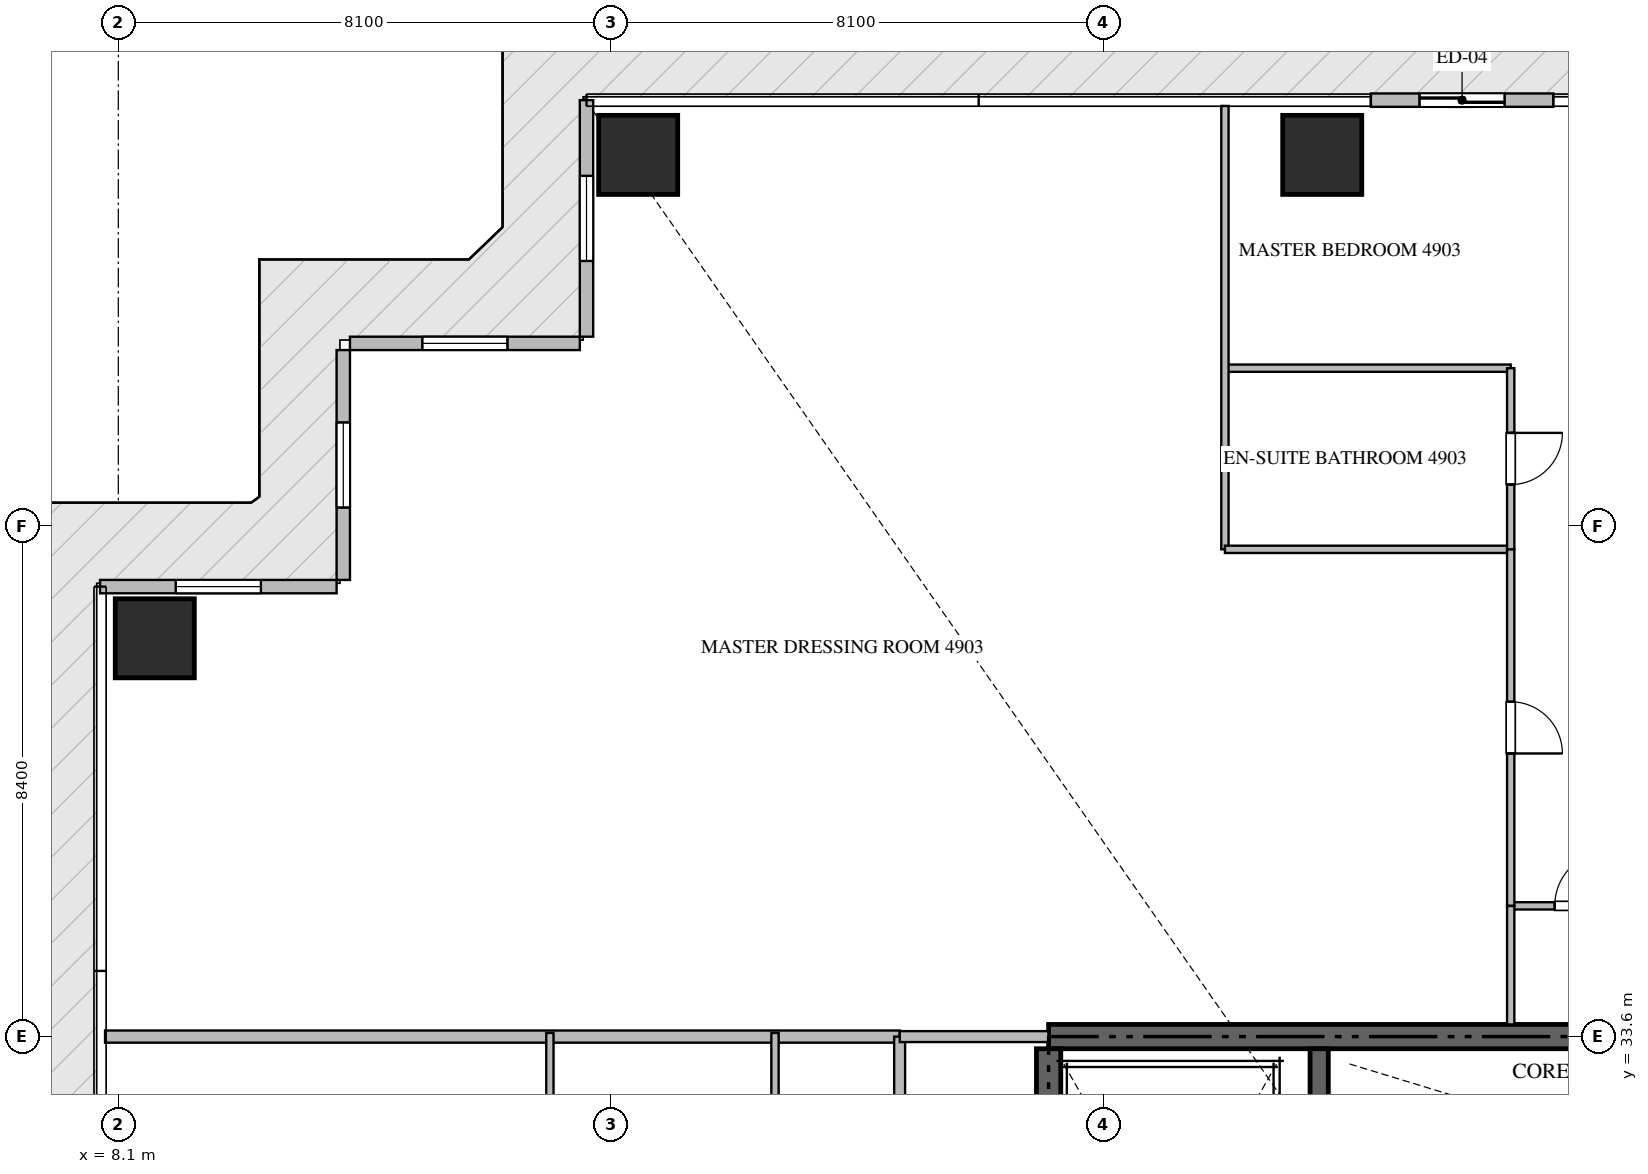
"""IFC4 building model, lengths in metres.
Left out: names, types, materials, properties, quantities, classifications, styles, units other than length and angle.
Written with IfcOpenShell. Run it as: python <this file> out.ifc"""

import sys

from ifc_helpers import new_model, si_unit, direction, frame, frame_2d, origin, origin_2d, place, context, subcontext, project, spatial, rectangle, extrude, source, transform, mapped, element, fill, save


model = new_model("IFC4")
c1 = context("Model", 3, precision=1e-05, world=origin(), true_north=direction((0.0, 1.0)))
c2 = subcontext(c1, "Body", "Model", "MODEL_VIEW")
j1 = project(units=[si_unit("LENGTHUNIT", "METRE"), si_unit("PLANEANGLEUNIT", "RADIAN")], contexts=[c1])
p1 = place(None, origin())
s1 = spatial("IfcSite", under=j1, at=p1, CompositionType="ELEMENT")
p2 = place(p1, origin())
s2 = spatial("IfcBuilding", under=s1, at=p2, CompositionType="ELEMENT")
p3 = place(p2, frame((0.0, 0.0, 195.15)))
s3 = spatial("IfcBuildingStorey", under=s2, at=p3, CompositionType="ELEMENT", Elevation=195.15)
p4 = place(p3, frame((41.4, 33.6, -0.26), z_axis=(0.0, 0.0, 1.0), x_axis=(-1.0, 0.0, 0.0)))
e1 = element("IfcWall", 1, at=p4, inside=s3, PredefinedType="SHEAR", context=c2, shape_type="SweptSolid", body=[
    extrude(rectangle(XDim=18.0, YDim=0.4, at=frame_2d((9.0, 0.0))), origin(), (0.0, 0.0, 1.0), 3.568),
])
p5 = place(p3, frame((23.4, 24.25, -0.26), z_axis=(0.0, 0.0, 1.0), x_axis=(0.0, 1.0, 0.0)))
e2 = element("IfcWall", 2, at=p5, inside=s3, PredefinedType="SHEAR", context=c2, shape_type="SweptSolid", body=[
    extrude(rectangle(XDim=9.15, YDim=0.4, at=frame_2d((4.575, 0.0))), origin(), (0.0, 0.0, 1.0), 3.568),
])
p6 = place(p3, frame((27.85, 23.55, -0.26), z_axis=(0.0, 0.0, 1.0), x_axis=(0.0, 1.0, 0.0)))
e3 = element("IfcWall", 3, at=p6, inside=s3, PredefinedType="SHEAR", context=c2, shape_type="SweptSolid", body=[
    extrude(rectangle(XDim=9.85, YDim=0.3, at=frame_2d((4.925, 0.0))), origin(), (0.0, 0.0, 1.0), 3.568),
])
m1 = source(origin(), c2, "Body", "SweptSolid", [
    extrude(rectangle(XDim=1.3, YDim=1.3, at=origin_2d()), origin(), (0.0, 0.0, 1.0), 3.57),
])
for number, where, z_axis, x_axis in (
    (4, (16.65, 48.1, -0.26), (0.0, 0.0, 1.0), (1.0, 0.0, 0.0)),
    (5, (27.9, 48.1, -0.26), (0.0, 0.0, 1.0), (1.0, 0.0, 0.0)),
    (6, (8.7, 40.15, -0.26), (0.0, 0.0, 1.0), (1.0, 0.0, 0.0)),
):
    element("IfcColumn", number, at=place(p3, frame(where, z_axis=z_axis, x_axis=x_axis)), inside=s3, PredefinedType="COLUMN", context=c2, shape_type="MappedRepresentation", body=[
        mapped(m1, transform((0.0, 0.0, 0.0), scale=1.0)),
    ])
p7 = place(p3, frame((31.7, 49.0, 0.0), z_axis=(0.0, 0.0, 1.0), x_axis=(-1.0, 0.0, 0.0)))
e7 = element("IfcWall", 7, at=p7, inside=s3, PredefinedType="ELEMENTEDWALL", context=c2, shape_type="SweptSolid", body=[
    extrude(rectangle(XDim=3.0, YDim=0.22, at=frame_2d((1.5, 0.0))), origin(), (0.0, 0.0, 1.0), 3.295),
])
p8 = place(p7, frame((0.8, 0.0, 0.0)))
e8 = element("IfcOpeningElement", 8, at=p8, cuts=e7, PredefinedType="OPENING", context=c2, shape_type="SweptSolid", body=[
    extrude(rectangle(XDim=1.4, YDim=2.25, at=frame_2d((0.7, 1.125))), frame((0.0, 0.12, 0.0), z_axis=(0.0, -1.0, 0.0), x_axis=(1.0, 0.0, 0.0)), (0.0, 0.0, 1.0), 0.24),
])
p9 = place(p3, frame((15.8, 49.0, 0.0), z_axis=(0.0, 0.0, 1.0), x_axis=(0.0, -1.0, 0.0)))
e9 = element("IfcWall", 9, at=p9, inside=s3, PredefinedType="ELEMENTEDWALL", context=c2, shape_type="SweptSolid", body=[
    extrude(rectangle(XDim=3.89, YDim=0.22, at=frame_2d((1.945, 0.0))), origin(), (0.0, 0.0, 1.0), 3.295),
])
p10 = place(p9, frame((1.245, 0.0, 0.65)))
e10 = element("IfcOpeningElement", 10, at=p10, cuts=e9, PredefinedType="OPENING", context=c2, shape_type="SweptSolid", body=[
    extrude(rectangle(XDim=1.4, YDim=1.35, at=frame_2d((0.7, 0.675))), frame((0.0, 0.12, 0.0), z_axis=(0.0, -1.0, 0.0), x_axis=(1.0, 0.0, 0.0)), (0.0, 0.0, 1.0), 0.24),
])
p11 = place(p3, frame((15.69, 45.0, 0.0), z_axis=(0.0, 0.0, 1.0), x_axis=(-1.0, 0.0, 0.0)))
e11 = element("IfcWall", 11, at=p11, inside=s3, PredefinedType="ELEMENTEDWALL", context=c2, shape_type="SweptSolid", body=[
    extrude(rectangle(XDim=3.78, YDim=0.22, at=frame_2d((1.89, 0.0))), origin(), (0.0, 0.0, 1.0), 3.295),
])
p12 = place(p11, frame((1.19, 0.0, 0.65)))
e12 = element("IfcOpeningElement", 12, at=p12, cuts=e11, PredefinedType="OPENING", context=c2, shape_type="SweptSolid", body=[
    extrude(rectangle(XDim=1.4, YDim=1.35, at=frame_2d((0.7, 0.675))), frame((0.0, 0.12, 0.0), z_axis=(0.0, -1.0, 0.0), x_axis=(1.0, 0.0, 0.0)), (0.0, 0.0, 1.0), 0.24),
])
p13 = place(p3, frame((11.8, 44.89, 0.0), z_axis=(0.0, 0.0, 1.0), x_axis=(0.0, -1.0, 0.0)))
e13 = element("IfcWall", 13, at=p13, inside=s3, PredefinedType="ELEMENTEDWALL", context=c2, shape_type="SweptSolid", body=[
    extrude(rectangle(XDim=3.78, YDim=0.22, at=frame_2d((1.89, 0.0))), origin(), (0.0, 0.0, 1.0), 3.295),
])
p14 = place(p13, frame((1.19, 0.0, 0.65)))
e14 = element("IfcOpeningElement", 14, at=p14, cuts=e13, PredefinedType="OPENING", context=c2, shape_type="SweptSolid", body=[
    extrude(rectangle(XDim=1.4, YDim=1.35, at=frame_2d((0.7, 0.675))), frame((0.0, 0.12, 0.0), z_axis=(0.0, -1.0, 0.0), x_axis=(1.0, 0.0, 0.0)), (0.0, 0.0, 1.0), 0.24),
])
p15 = place(p3, frame((11.69, 41.0, 0.0), z_axis=(0.0, 0.0, 1.0), x_axis=(-1.0, 0.0, 0.0)))
e15 = element("IfcWall", 15, at=p15, inside=s3, PredefinedType="ELEMENTEDWALL", context=c2, shape_type="SweptSolid", body=[
    extrude(rectangle(XDim=3.89, YDim=0.22, at=frame_2d((1.945, 0.0))), origin(), (0.0, 0.0, 1.0), 3.295),
])
p16 = place(p15, frame((1.245, 0.0, 0.65)))
e16 = element("IfcOpeningElement", 16, at=p16, cuts=e15, PredefinedType="OPENING", context=c2, shape_type="SweptSolid", body=[
    extrude(rectangle(XDim=1.4, YDim=1.35, at=frame_2d((0.7, 0.675))), frame((0.0, 0.12, 0.0), z_axis=(0.0, -1.0, 0.0), x_axis=(1.0, 0.0, 0.0)), (0.0, 0.0, 1.0), 0.24),
])
p17 = place(p3, frame((7.882, 33.6, 0.0), z_axis=(0.0, 0.0, 1.0), x_axis=(1.0, 0.0, 0.0)))
e17 = element("IfcWall", 17, at=p17, inside=s3, PredefinedType="PARTITIONING", context=c2, shape_type="SweptSolid", body=[
    extrude(rectangle(XDim=13.068, YDim=0.2, at=frame_2d((6.534, 0.0))), origin(), (0.0, 0.0, 1.0), 3.31),
])
p18 = place(p3, frame((20.95, 14.9, 0.0), z_axis=(0.0, 0.0, 1.0), x_axis=(0.0, 1.0, 0.0)))
e18 = element("IfcWall", 18, at=p18, inside=s3, PredefinedType="PARTITIONING", context=c2, shape_type="SweptSolid", body=[
    extrude(rectangle(XDim=18.7, YDim=0.18, at=frame_2d((9.35, 0.0))), origin(), (0.0, 0.0, 1.0), 3.31),
])
p19 = place(p18, frame((1.805, 0.0, 0.0)))
e19 = element("IfcOpeningElement", 19, at=p19, cuts=e18, PredefinedType="OPENING", context=c2, shape_type="SweptSolid", body=[
    extrude(rectangle(XDim=1.0, YDim=2.15, at=frame_2d((0.5, 1.075))), frame((0.0, 0.1, 0.0), z_axis=(0.0, -1.0, 0.0), x_axis=(1.0, 0.0, 0.0)), (0.0, 0.0, 1.0), 0.2),
])
p20 = place(p18, frame((10.602, 0.0, 0.0)))
e20 = element("IfcOpeningElement", 20, at=p20, cuts=e18, PredefinedType="OPENING", context=c2, shape_type="SweptSolid", body=[
    extrude(rectangle(XDim=1.0, YDim=2.15, at=frame_2d((0.5, 1.075))), frame((0.0, 0.1, 0.0), z_axis=(0.0, -1.0, 0.0), x_axis=(1.0, 0.0, 0.0)), (0.0, 0.0, 1.0), 0.2),
])
p21 = place(p3, frame((20.952, 33.6, 0.0), z_axis=(0.0, 0.0, 1.0), x_axis=(1.0, 0.0, 0.0)))
e21 = element("IfcWall", 21, at=p21, inside=s3, PredefinedType="PARTITIONING", context=c2, shape_type="SweptSolid", body=[
    extrude(rectangle(XDim=2.446, YDim=0.18, at=frame_2d((1.223, 0.0))), origin(), (0.0, 0.0, 1.0), 3.31),
])
p22 = place(p3, frame((31.0, 35.75, 0.0), z_axis=(0.0, 0.0, 1.0), x_axis=(1.0, 0.0, 0.0)))
e22 = element("IfcWall", 22, at=p22, inside=s3, PredefinedType="PARTITIONING", context=c2, shape_type="SweptSolid", body=[
    extrude(rectangle(XDim=2.348, YDim=0.12, at=frame_2d((1.174, 0.0))), origin(), (0.0, 0.0, 1.0), 3.31),
])
p23 = place(p22, frame((0.724, 0.0, 0.0)))
e23 = element("IfcOpeningElement", 23, at=p23, cuts=e22, PredefinedType="OPENING", context=c2, shape_type="SweptSolid", body=[
    extrude(rectangle(XDim=0.9, YDim=2.1, at=frame_2d((0.45, 1.05))), frame((0.0, 0.07, 0.0), z_axis=(0.0, -1.0, 0.0), x_axis=(1.0, 0.0, 0.0)), (0.0, 0.0, 1.0), 0.14),
])
p24 = place(p3, frame((26.3, 44.592, 0.0), z_axis=(0.0, 0.0, 1.0), x_axis=(1.0, 0.0, 0.0)))
e24 = element("IfcWall", 24, at=p24, inside=s3, PredefinedType="PARTITIONING", context=c2, shape_type="SweptSolid", body=[
    extrude(rectangle(XDim=4.7, YDim=0.12, at=frame_2d((2.35, 0.0))), origin(), (0.0, 0.0, 1.0), 3.31),
])
p25 = place(p3, frame((26.3, 48.905, 0.0), z_axis=(0.0, 0.0, 1.0), x_axis=(0.0, -1.0, 0.0)))
e25 = element("IfcWall", 25, at=p25, inside=s3, PredefinedType="PARTITIONING", context=c2, shape_type="SweptSolid", body=[
    extrude(rectangle(XDim=7.292, YDim=0.12, at=frame_2d((3.646, 0.0))), origin(), (0.0, 0.0, 1.0), 3.31),
])
p26 = place(p3, frame((26.3, 41.613, 0.0), z_axis=(0.0, 0.0, 1.0), x_axis=(1.0, 0.0, 0.0)))
e26 = element("IfcWall", 26, at=p26, inside=s3, PredefinedType="PARTITIONING", context=c2, shape_type="SweptSolid", body=[
    extrude(rectangle(XDim=4.7, YDim=0.12, at=frame_2d((2.35, 0.0))), origin(), (0.0, 0.0, 1.0), 3.31),
])
p27 = place(p3, frame((31.0, 44.592, 0.0), z_axis=(0.0, 0.0, 1.0), x_axis=(0.0, -1.0, 0.0)))
e27 = element("IfcWall", 27, at=p27, inside=s3, PredefinedType="PARTITIONING", context=c2, shape_type="SweptSolid", body=[
    extrude(rectangle(XDim=2.979, YDim=0.12, at=frame_2d((1.49, 0.0))), origin(), (0.0, 0.0, 1.0), 3.31),
])
p28 = place(p27, frame((1.064, 0.0, 0.0)))
e28 = element("IfcOpeningElement", 28, at=p28, cuts=e27, PredefinedType="OPENING", context=c2, shape_type="SweptSolid", body=[
    extrude(rectangle(XDim=0.85, YDim=2.1, at=frame_2d((0.425, 1.05))), frame((0.0, 0.07, 0.0), z_axis=(0.0, -1.0, 0.0), x_axis=(1.0, 0.0, 0.0)), (0.0, 0.0, 1.0), 0.14),
])
p29 = place(p3, frame((31.0, 41.611, 0.0), z_axis=(0.0, 0.0, 1.0), x_axis=(0.0, -1.0, 0.0)))
e29 = element("IfcWall", 29, at=p29, inside=s3, PredefinedType="PARTITIONING", context=c2, shape_type="SweptSolid", body=[
    extrude(rectangle(XDim=5.861, YDim=0.12, at=frame_2d((2.931, 0.0))), origin(), (0.0, 0.0, 1.0), 3.31),
])
p30 = place(p29, frame((2.505, 0.0, 0.0)))
e30 = element("IfcOpeningElement", 30, at=p30, cuts=e29, PredefinedType="OPENING", context=c2, shape_type="SweptSolid", body=[
    extrude(rectangle(XDim=0.85, YDim=2.1, at=frame_2d((0.425, 1.05))), frame((0.0, 0.07, 0.0), z_axis=(0.0, -1.0, 0.0), x_axis=(1.0, 0.0, 0.0)), (0.0, 0.0, 1.0), 0.14),
])
p31 = place(p3, frame((31.0, 35.748, 0.0), z_axis=(0.0, 0.0, 1.0), x_axis=(0.0, -1.0, 0.0)))
e31 = element("IfcWall", 31, at=p31, inside=s3, PredefinedType="PARTITIONING", context=c2, shape_type="SweptSolid", body=[
    extrude(rectangle(XDim=1.948, YDim=0.12, at=frame_2d((0.974, 0.0))), origin(), (0.0, 0.0, 1.0), 3.31),
])
for number, where, z_axis, x_axis in (
    (32, (15.198, 27.8, 0.0), (0.0, 0.0, 1.0), (0.0, 1.0, 0.0)),
    (33, (18.9, 27.8, 0.0), (0.0, 0.0, 1.0), (0.0, 1.0, 0.0)),
):
    element("IfcWall", number, at=place(p3, frame(where, z_axis=z_axis, x_axis=x_axis)), inside=s3, PredefinedType="PARTITIONING", context=c2, shape_type="SweptSolid", body=[
        extrude(rectangle(XDim=5.86, YDim=0.12, at=frame_2d((2.93, 0.0))), origin(), (0.0, 0.0, 1.0), 3.31),
    ])
m2 = source(origin(), c2, "Body", "SweptSolid", [
    extrude(rectangle(XDim=1.4, YDim=2.25, at=frame_2d((0.7, 1.125))), frame((0.0, 0.025, 0.0), z_axis=(0.0, -1.0, 0.0), x_axis=(1.0, 0.0, 0.0)), (0.0, 0.0, 1.0), 0.05),
])
p32 = place(p8, origin())
e34 = element("IfcDoor", 34, at=p32, inside=s3, OperationType="SLIDING_TO_LEFT", PredefinedType="DOOR", context=c2, shape_type="MappedRepresentation", body=[
    mapped(m2, transform((0.0, 0.0, 0.0), scale=1.0)),
])
fill(e8, e34)
m3 = source(origin(), c2, "Body", "SweptSolid", [
    extrude(rectangle(XDim=1.4, YDim=1.35, at=frame_2d((0.7, 0.675))), frame((0.0, 0.03, 0.0), z_axis=(0.0, -1.0, 0.0), x_axis=(1.0, 0.0, 0.0)), (0.0, 0.0, 1.0), 0.06),
])
p33 = place(p10, origin())
e35 = element("IfcWindow", 35, at=p33, inside=s3, PartitioningType="SINGLE_PANEL", PredefinedType="WINDOW", context=c2, shape_type="MappedRepresentation", body=[
    mapped(m3, transform((0.0, 0.0, 0.0), scale=1.0)),
])
fill(e10, e35)
p34 = place(p12, origin())
e36 = element("IfcWindow", 36, at=p34, inside=s3, PartitioningType="SINGLE_PANEL", PredefinedType="WINDOW", context=c2, shape_type="MappedRepresentation", body=[
    mapped(m3, transform((0.0, 0.0, 0.0), scale=1.0)),
])
fill(e12, e36)
p35 = place(p14, origin())
e37 = element("IfcWindow", 37, at=p35, inside=s3, PartitioningType="SINGLE_PANEL", PredefinedType="WINDOW", context=c2, shape_type="MappedRepresentation", body=[
    mapped(m3, transform((0.0, 0.0, 0.0), scale=1.0)),
])
fill(e14, e37)
p36 = place(p16, origin())
e38 = element("IfcWindow", 38, at=p36, inside=s3, PartitioningType="SINGLE_PANEL", PredefinedType="WINDOW", context=c2, shape_type="MappedRepresentation", body=[
    mapped(m3, transform((0.0, 0.0, 0.0), scale=1.0)),
])
fill(e16, e38)
m4 = source(origin(), c2, "Body", "SweptSolid", [
    extrude(rectangle(XDim=0.9, YDim=2.1, at=frame_2d((0.45, 1.05))), frame((0.0, 0.025, 0.0), z_axis=(0.0, -1.0, 0.0), x_axis=(1.0, 0.0, 0.0)), (0.0, 0.0, 1.0), 0.05),
])
p37 = place(p23, origin())
e39 = element("IfcDoor", 39, at=p37, inside=s3, OperationType="SINGLE_SWING_RIGHT", PredefinedType="DOOR", context=c2, shape_type="MappedRepresentation", body=[
    mapped(m4, transform((0.0, 0.0, 0.0), scale=1.0)),
])
fill(e23, e39)
m5 = source(origin(), c2, "Body", "SweptSolid", [
    extrude(rectangle(XDim=0.85, YDim=2.1, at=frame_2d((0.425, 1.05))), frame((0.0, 0.025, 0.0), z_axis=(0.0, -1.0, 0.0), x_axis=(1.0, 0.0, 0.0)), (0.0, 0.0, 1.0), 0.05),
])
p38 = place(p28, origin())
e40 = element("IfcDoor", 40, at=p38, inside=s3, OperationType="SINGLE_SWING_LEFT", PredefinedType="DOOR", context=c2, shape_type="MappedRepresentation", body=[
    mapped(m5, transform((0.0, 0.0, 0.0), scale=1.0)),
])
fill(e28, e40)
p39 = place(p30, origin())
e41 = element("IfcDoor", 41, at=p39, inside=s3, OperationType="SINGLE_SWING_RIGHT", PredefinedType="DOOR", context=c2, shape_type="MappedRepresentation", body=[
    mapped(m5, transform((0.0, 0.0, 0.0), scale=1.0)),
])
fill(e30, e41)
save(model, sys.argv[1])
